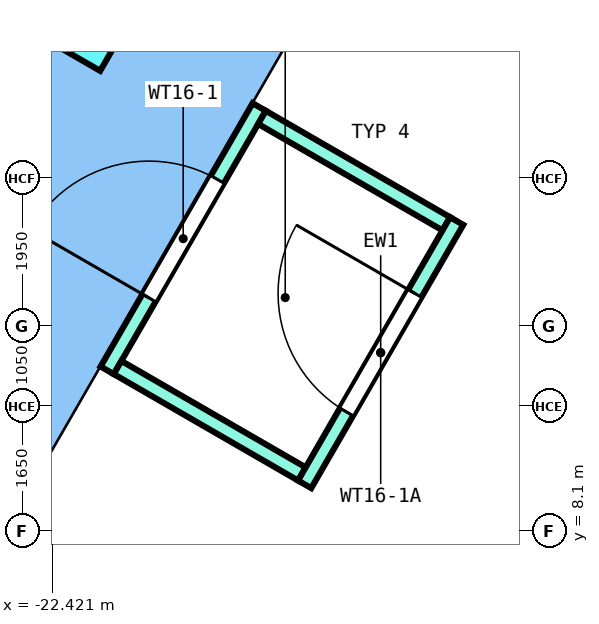
"""IFC4 building model, lengths in metres.
Left out: names, types, materials, properties, quantities, classifications, styles, units other than length and angle.
Written with IfcOpenShell. Run it as: python <this file> out.ifc"""

import sys

from ifc_helpers import new_model, si_unit, direction, frame, frame_2d, origin, origin_2d, place, context, subcontext, project, spatial, rectangle, extrude, element, fill, save


model = new_model("IFC4")
c1 = context("Model", 3, precision=1e-05, world=origin(), true_north=direction((0.0, 1.0)))
c2 = subcontext(c1, "Body", "Model", "MODEL_VIEW")
j1 = project(units=[si_unit("LENGTHUNIT", "METRE"), si_unit("PLANEANGLEUNIT", "RADIAN")], contexts=[c1])
p1 = place(None, origin())
s1 = spatial("IfcSite", under=j1, at=p1, CompositionType="ELEMENT")
p2 = place(p1, origin())
s2 = spatial("IfcBuilding", under=s1, at=p2, CompositionType="ELEMENT")
p3 = place(p2, frame((0.0, 0.0, 71.8)))
s3 = spatial("IfcBuildingStorey", under=s2, at=p3, CompositionType="ELEMENT", Elevation=71.8)
p4 = place(p3, frame((-22.065, 15.183, 0.0), z_axis=(0.0, 0.0, 1.0), x_axis=(-0.5, -0.866025403784, 0.0)))
e1 = element("IfcColumn", 1, at=p4, inside=s3, PredefinedType="COLUMN", context=c2, shape_type="SweptSolid", body=[
    extrude(rectangle(XDim=1.5, YDim=1.5, at=origin_2d()), origin(), (0.0, 0.0, 1.0), 8.65),
])
p5 = place(p3, frame((-19.698, 13.682, 0.0), z_axis=(0.0, 0.0, 1.0), x_axis=(-0.49999894854, -0.866026010844, 0.0)))
e2 = element("IfcWall", 2, at=p5, inside=s3, PredefinedType="SOLIDWALL", context=c2, shape_type="SweptSolid", body=[
    extrude(rectangle(XDim=4.0, YDim=0.2, at=frame_2d((2.0, 0.0))), origin(), (0.0, 0.0, 1.0), 7.65),
])
p6 = place(p5, frame((1.1, 0.0, 0.0)))
e3 = element("IfcOpeningElement", 3, at=p6, cuts=e2, PredefinedType="OPENING", context=c2, shape_type="SweptSolid", body=[
    extrude(rectangle(XDim=1.8, YDim=2.4, at=frame_2d((0.9, 1.2))), frame((0.0, 0.11, 0.0), z_axis=(0.0, -1.0, 0.0), x_axis=(1.0, 0.0, 0.0)), (0.0, 0.0, 1.0), 0.22),
])
p7 = place(p3, frame((-19.661, 13.545, 0.0), z_axis=(0.0, 0.0, 1.0), x_axis=(0.866034573852, -0.49998411664, 0.0)))
e4 = element("IfcWall", 4, at=p7, inside=s3, PredefinedType="SOLIDWALL", context=c2, shape_type="SweptSolid", body=[
    extrude(rectangle(XDim=2.8, YDim=0.2, at=frame_2d((1.4, 0.0))), origin(), (0.0, 0.0, 1.0), 7.65),
])
p8 = place(p3, frame((-21.561, 10.255, 0.0), z_axis=(0.0, 0.0, 1.0), x_axis=(0.865996816683, -0.500049511043, 0.0)))
e5 = element("IfcWall", 5, at=p8, inside=s3, PredefinedType="SOLIDWALL", context=c2, shape_type="SweptSolid", body=[
    extrude(rectangle(XDim=2.8, YDim=0.2, at=frame_2d((1.4, 0.0))), origin(), (0.0, 0.0, 1.0), 7.65),
])
p9 = place(p3, frame((-17.1, 12.182, 0.0), z_axis=(0.0, 0.0, 1.0), x_axis=(-0.49999894854, -0.866026010844, 0.0)))
e6 = element("IfcWall", 6, at=p9, inside=s3, PredefinedType="SOLIDWALL", context=c2, shape_type="SweptSolid", body=[
    extrude(rectangle(XDim=4.0, YDim=0.2, at=frame_2d((2.0, 0.0))), origin(), (0.0, 0.0, 1.0), 7.65),
])
p10 = place(p9, frame((1.1, 0.0, 0.0)))
e7 = element("IfcOpeningElement", 7, at=p10, cuts=e6, PredefinedType="OPENING", context=c2, shape_type="SweptSolid", body=[
    extrude(rectangle(XDim=1.8, YDim=2.4, at=frame_2d((0.9, 1.2))), frame((0.0, 0.11, 0.0), z_axis=(0.0, -1.0, 0.0), x_axis=(1.0, 0.0, 0.0)), (0.0, 0.0, 1.0), 0.22),
])
p11 = place(p6, origin())
e8 = element("IfcDoor", 8, at=p11, inside=s3, OperationType="DOUBLE_DOOR_SINGLE_SWING", PredefinedType="DOOR", context=c2, shape_type="SweptSolid", body=[
    extrude(rectangle(XDim=1.8, YDim=2.4, at=frame_2d((0.9, 1.2))), frame((0.0, 0.025, 0.0), z_axis=(0.0, -1.0, 0.0), x_axis=(1.0, 0.0, 0.0)), (0.0, 0.0, 1.0), 0.05),
])
fill(e3, e8)
p12 = place(p10, origin())
e9 = element("IfcDoor", 9, at=p12, inside=s3, OperationType="DOUBLE_DOOR_SINGLE_SWING", PredefinedType="DOOR", context=c2, shape_type="SweptSolid", body=[
    extrude(rectangle(XDim=1.8, YDim=2.4, at=frame_2d((0.9, 1.2))), frame((0.0, 0.025, 0.0), z_axis=(0.0, -1.0, 0.0), x_axis=(1.0, 0.0, 0.0)), (0.0, 0.0, 1.0), 0.05),
])
fill(e7, e9)
save(model, sys.argv[1])
